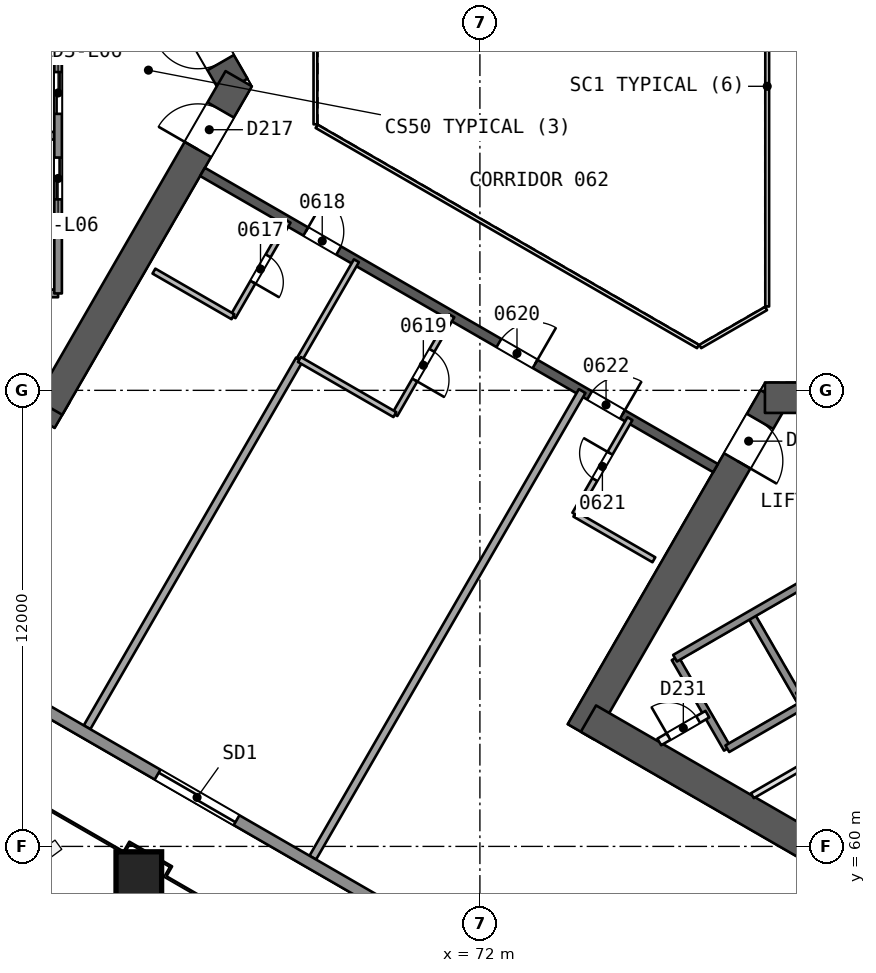
"""IFC4 building model, lengths in metres.
Left out: names, types, materials, properties, quantities, classifications, styles, units other than length and angle.
Written with IfcOpenShell. Run it as: python <this file> out.ifc"""

import sys

from ifc_helpers import new_model, si_unit, direction, frame, frame_2d, origin, origin_2d, place, context, subcontext, project, spatial, rectangle, extrude, element, fill, save


model = new_model("IFC4")
c1 = context("Model", 3, precision=1e-05, world=origin(), true_north=direction((0.0, 1.0)))
c2 = subcontext(c1, "Body", "Model", "MODEL_VIEW")
j1 = project(units=[si_unit("LENGTHUNIT", "METRE"), si_unit("PLANEANGLEUNIT", "RADIAN")], contexts=[c1])
p1 = place(None, origin())
s1 = spatial("IfcSite", under=j1, at=p1, CompositionType="ELEMENT")
p2 = place(p1, origin())
s2 = spatial("IfcBuilding", under=s1, at=p2, CompositionType="ELEMENT")
p3 = place(p2, frame((0.0, 0.0, 33.7)))
s3 = spatial("IfcBuildingStorey", under=s2, at=p3, CompositionType="ELEMENT", Elevation=33.7)
p4 = place(p3, frame((65.538, 80.0, 0.0), z_axis=(0.0, 0.0, 1.0), x_axis=(-0.49999662545, 0.866027352073, 0.0)))
e1 = element("IfcWall", 1, at=p4, inside=s3, PredefinedType="SHEAR", context=c2, shape_type="SweptSolid", body=[
    extrude(rectangle(XDim=10.149, YDim=0.8, at=frame_2d((5.074, 0.0))), origin(), (0.0, 0.0, 1.0), 3.7),
])
p5 = place(p4, frame((0.719, 0.0, 0.0)))
e2 = element("IfcOpeningElement", 2, at=p5, cuts=e1, PredefinedType="OPENING", context=c2, shape_type="SweptSolid", body=[
    extrude(rectangle(XDim=1.2, YDim=2.1, at=frame_2d((0.6, 1.05))), frame((0.0, 0.411, 0.0), z_axis=(0.0, -1.0, 0.0), x_axis=(1.0, 0.0, 0.0)), (0.0, 0.0, 1.0), 0.821),
])
p6 = place(p3, frame((48.797, 78.408, 0.0), z_axis=(0.0, 0.0, 1.0), x_axis=(0.866032504327, -0.499987701298, 0.0)))
e3 = element("IfcWall", 3, at=p6, inside=s3, PredefinedType="SHEAR", context=c2, shape_type="SweptSolid", body=[
    extrude(rectangle(XDim=14.102, YDim=0.8, at=frame_2d((7.051, 0.0))), origin(), (0.0, 0.0, 1.0), 3.7),
])
p7 = place(p3, frame((60.664, 71.557, 0.0), z_axis=(0.0, 0.0, 1.0), x_axis=(0.50000409368, 0.866023040284, 0.0)))
e4 = element("IfcWall", 4, at=p7, inside=s3, PredefinedType="SHEAR", context=c2, shape_type="SweptSolid", body=[
    extrude(rectangle(XDim=9.98, YDim=0.8, at=frame_2d((4.99, 0.0))), origin(), (0.0, 0.0, 1.0), 3.7),
])
p8 = place(p7, frame((7.83, 0.0, 0.0)))
e5 = element("IfcOpeningElement", 5, at=p8, cuts=e4, PredefinedType="OPENING", context=c2, shape_type="SweptSolid", body=[
    extrude(rectangle(XDim=1.2, YDim=2.1, at=frame_2d((0.6, 1.05))), frame((0.0, 0.411, 0.0), z_axis=(0.0, -1.0, 0.0), x_axis=(1.0, 0.0, 0.0)), (0.0, 0.0, 1.0), 0.821),
])
p9 = place(p3, frame((79.731, 71.806, 0.0), z_axis=(0.0, 0.0, 1.0), x_axis=(-0.49999662545, -0.866027352073, 0.0)))
e6 = element("IfcWall", 6, at=p9, inside=s3, PredefinedType="SHEAR", context=c2, shape_type="SweptSolid", body=[
    extrude(rectangle(XDim=10.149, YDim=0.8, at=frame_2d((5.074, 0.0))), origin(), (0.0, 0.0, 1.0), 3.7),
])
p10 = place(p9, frame((0.719, 0.0, 0.0)))
e7 = element("IfcOpeningElement", 7, at=p10, cuts=e6, PredefinedType="OPENING", context=c2, shape_type="SweptSolid", body=[
    extrude(rectangle(XDim=1.2, YDim=2.1, at=frame_2d((0.6, 1.05))), frame((0.0, 0.411, 0.0), z_axis=(0.0, -1.0, 0.0), x_axis=(1.0, 0.0, 0.0)), (0.0, 0.0, 1.0), 0.821),
])
p11 = place(p3, frame((74.856, 63.363, 0.0), z_axis=(0.0, 0.0, 1.0), x_axis=(0.866029478545, -0.499992942241, 0.0)))
e8 = element("IfcWall", 8, at=p11, inside=s3, PredefinedType="SHEAR", context=c2, shape_type="SweptSolid", body=[
    extrude(rectangle(XDim=13.933, YDim=0.8, at=frame_2d((6.967, 0.0))), origin(), (0.0, 0.0, 1.0), 3.7),
])
p12 = place(p3, frame((89.48, 71.806, 0.0), z_axis=(0.0, 0.0, 1.0), x_axis=(-1.0, 0.0, 0.0)))
e9 = element("IfcWall", 9, at=p12, inside=s3, PredefinedType="SHEAR", context=c2, shape_type="SweptSolid", body=[
    extrude(rectangle(XDim=9.98, YDim=0.8, at=frame_2d((4.99, 0.0))), origin(), (0.0, 0.0, 1.0), 3.7),
])
p13 = place(p12, frame((7.83, 0.0, 0.0)))
e10 = element("IfcOpeningElement", 10, at=p13, cuts=e9, PredefinedType="OPENING", context=c2, shape_type="SweptSolid", body=[
    extrude(rectangle(XDim=1.2, YDim=2.1, at=frame_2d((0.6, 1.05))), frame((0.0, 0.411, 0.0), z_axis=(0.0, -1.0, 0.0), x_axis=(1.0, 0.0, 0.0)), (0.0, 0.0, 1.0), 0.821),
])
p14 = place(p3, frame((64.7, 77.748, 0.0), z_axis=(0.0, 0.0, 1.0), x_axis=(0.866026492143, -0.499998114903, 0.0)))
e11 = element("IfcWall", 11, at=p14, inside=s3, PredefinedType="SHEAR", context=c2, shape_type="SweptSolid", body=[
    extrude(rectangle(XDim=15.588, YDim=0.25, at=frame_2d((7.794, 0.0))), origin(), (0.0, 0.0, 1.0), 3.2),
])
p15 = place(p14, frame((3.138, 0.0, 0.0)))
e12 = element("IfcOpeningElement", 12, at=p15, cuts=e11, PredefinedType="OPENING", context=c2, shape_type="SweptSolid", body=[
    extrude(rectangle(XDim=1.0, YDim=2.1, at=frame_2d((0.5, 1.05))), frame((0.0, 0.135, 0.0), z_axis=(0.0, -1.0, 0.0), x_axis=(1.0, 0.0, 0.0)), (0.0, 0.0, 1.0), 0.271),
])
p16 = place(p14, frame((9.006, 0.0, 0.0)))
e13 = element("IfcOpeningElement", 13, at=p16, cuts=e11, PredefinedType="OPENING", context=c2, shape_type="SweptSolid", body=[
    extrude(rectangle(XDim=1.1, YDim=2.1, at=frame_2d((0.55, 1.05))), frame((0.0, 0.135, 0.0), z_axis=(0.0, -1.0, 0.0), x_axis=(1.0, 0.0, 0.0)), (0.0, 0.0, 1.0), 0.271),
])
p17 = place(p14, frame((11.762, 0.0, 0.0)))
e14 = element("IfcOpeningElement", 14, at=p17, cuts=e11, PredefinedType="OPENING", context=c2, shape_type="SweptSolid", body=[
    extrude(rectangle(XDim=1.0, YDim=2.1, at=frame_2d((0.5, 1.05))), frame((0.0, 0.135, 0.0), z_axis=(0.0, -1.0, 0.0), x_axis=(1.0, 0.0, 0.0)), (0.0, 0.0, 1.0), 0.271),
])
p18 = place(p3, frame((63.012, 59.237, 0.0), z_axis=(0.010093620709, 0.017482414954, 0.999796221231), x_axis=(-0.499912926478, -0.865840372083, 0.020187025823)))
e15 = element("IfcColumn", 15, at=p18, inside=s3, PredefinedType="COLUMN", context=c2, shape_type="SweptSolid", body=[
    extrude(rectangle(XDim=1.2, YDim=1.2, at=origin_2d()), origin(), (0.0, 0.0, 1.0), 3.701),
])
p19 = place(p3, frame((66.952, 76.448, 0.0), z_axis=(0.0, 0.0, 1.0), x_axis=(-0.499987231761, -0.866032775405, 0.0)))
e16 = element("IfcWall", 16, at=p19, inside=s3, PredefinedType="PARTITIONING", context=c2, shape_type="SweptSolid", body=[
    extrude(rectangle(XDim=2.9, YDim=0.15, at=frame_2d((1.45, 0.0))), origin(), (0.0, 0.0, 1.0), 3.2),
])
p20 = place(p19, frame((1.05, 0.0, 0.0)))
e17 = element("IfcOpeningElement", 17, at=p20, cuts=e16, PredefinedType="OPENING", context=c2, shape_type="SweptSolid", body=[
    extrude(rectangle(XDim=0.8, YDim=2.1, at=frame_2d((0.4, 1.05))), frame((0.0, 0.085, 0.0), z_axis=(0.0, -1.0, 0.0), x_axis=(1.0, 0.0, 0.0)), (0.0, 0.0, 1.0), 0.171),
])
p21 = place(p3, frame((65.502, 73.937, 0.0), z_axis=(0.0, 0.0, 1.0), x_axis=(-0.865994240961, 0.500053971709, 0.0)))
e18 = element("IfcWall", 18, at=p21, inside=s3, PredefinedType="PARTITIONING", context=c2, shape_type="SweptSolid", body=[
    extrude(rectangle(XDim=2.401, YDim=0.15, at=frame_2d((1.201, 0.0))), origin(), (0.0, 0.0, 1.0), 3.2),
])
p22 = place(p3, frame((61.662, 63.133, 0.0), z_axis=(0.0, 0.0, 1.0), x_axis=(0.499999157533, 0.866025890183, 0.0)))
e19 = element("IfcWall", 19, at=p22, inside=s3, PredefinedType="PARTITIONING", context=c2, shape_type="SweptSolid", body=[
    extrude(rectangle(XDim=11.176, YDim=0.2, at=frame_2d((5.588, 0.0))), origin(), (0.0, 0.0, 1.0), 3.2),
])
p23 = place(p3, frame((67.25, 72.812, 0.0), z_axis=(0.0, 0.0, 1.0), x_axis=(0.499990139034, 0.866031096941, 0.0)))
e20 = element("IfcWall", 20, at=p23, inside=s3, PredefinedType="PARTITIONING", context=c2, shape_type="SweptSolid", body=[
    extrude(rectangle(XDim=3.0, YDim=0.15, at=frame_2d((1.5, 0.0))), origin(), (0.0, 0.0, 1.0), 3.2),
])
p24 = place(p3, frame((71.261, 73.96, 0.0), z_axis=(0.0, 0.0, 1.0), x_axis=(-0.50002537861, -0.866010750942, 0.0)))
e21 = element("IfcWall", 21, at=p24, inside=s3, PredefinedType="PARTITIONING", context=c2, shape_type="SweptSolid", body=[
    extrude(rectangle(XDim=3.0, YDim=0.15, at=frame_2d((1.5, 0.0))), origin(), (0.0, 0.0, 1.0), 3.2),
])
p25 = place(p24, frame((1.05, 0.0, 0.0)))
e22 = element("IfcOpeningElement", 22, at=p25, cuts=e21, PredefinedType="OPENING", context=c2, shape_type="SweptSolid", body=[
    extrude(rectangle(XDim=0.9, YDim=2.1, at=frame_2d((0.45, 1.05))), frame((0.0, 0.085, 0.0), z_axis=(0.0, -1.0, 0.0), x_axis=(1.0, 0.0, 0.0)), (0.0, 0.0, 1.0), 0.171),
])
p26 = place(p3, frame((69.761, 71.362, 0.0), z_axis=(0.0, 0.0, 1.0), x_axis=(-0.866032775405, 0.499987231761, 0.0)))
e23 = element("IfcWall", 23, at=p26, inside=s3, PredefinedType="PARTITIONING", context=c2, shape_type="SweptSolid", body=[
    extrude(rectangle(XDim=2.9, YDim=0.15, at=frame_2d((1.45, 0.0))), origin(), (0.0, 0.0, 1.0), 3.2),
])
p27 = place(p3, frame((67.602, 59.704, 0.0), z_axis=(0.0, 0.0, 1.0), x_axis=(0.499997249004, 0.866026992067, 0.0)))
e24 = element("IfcWall", 24, at=p27, inside=s3, PredefinedType="PARTITIONING", context=c2, shape_type="SweptSolid", body=[
    extrude(rectangle(XDim=14.176, YDim=0.2, at=frame_2d((7.088, 0.0))), origin(), (0.0, 0.0, 1.0), 3.2),
])
p28 = place(p3, frame((76.578, 67.542, 0.0), z_axis=(0.0, 0.0, 1.0), x_axis=(-0.866038271014, 0.499977712642, 0.0)))
e25 = element("IfcWall", 25, at=p28, inside=s3, PredefinedType="PARTITIONING", context=c2, shape_type="SweptSolid", body=[
    extrude(rectangle(XDim=2.401, YDim=0.15, at=frame_2d((1.2, 0.0))), origin(), (0.0, 0.0, 1.0), 3.2),
])
p29 = place(p3, frame((74.498, 68.743, 0.0), z_axis=(0.0, 0.0, 1.0), x_axis=(0.499987231761, 0.866032775405, 0.0)))
e26 = element("IfcWall", 26, at=p29, inside=s3, PredefinedType="PARTITIONING", context=c2, shape_type="SweptSolid", body=[
    extrude(rectangle(XDim=2.9, YDim=0.15, at=frame_2d((1.45, 0.0))), origin(), (0.0, 0.0, 1.0), 3.2),
])
p30 = place(p29, frame((1.05, 0.0, 0.0)))
e27 = element("IfcOpeningElement", 27, at=p30, cuts=e26, PredefinedType="OPENING", context=c2, shape_type="SweptSolid", body=[
    extrude(rectangle(XDim=0.8, YDim=2.1, at=frame_2d((0.4, 1.05))), frame((0.0, 0.085, 0.0), z_axis=(0.0, -1.0, 0.0), x_axis=(1.0, 0.0, 0.0)), (0.0, 0.0, 1.0), 0.171),
])
p31 = place(p3, frame((90.965, 46.043, 0.0), z_axis=(0.0, 0.0, 1.0), x_axis=(-0.866024438126, 0.500001672566, 0.0)))
e28 = element("IfcWall", 28, at=p31, inside=s3, PredefinedType="SOLIDWALL", context=c2, shape_type="SweptSolid", body=[
    extrude(rectangle(XDim=61.61, YDim=0.3, at=frame_2d((30.805, 0.0))), origin(), (0.0, 0.0, 1.0), 3.2),
])
p32 = place(p31, frame((29.293, 0.0, 0.0)))
e29 = element("IfcOpeningElement", 29, at=p32, cuts=e28, PredefinedType="OPENING", context=c2, shape_type="SweptSolid", body=[
    extrude(rectangle(XDim=2.4, YDim=2.4, at=frame_2d((1.2, 1.2))), frame((0.0, 0.161, 0.0), z_axis=(0.0, -1.0, 0.0), x_axis=(1.0, 0.0, 0.0)), (0.0, 0.0, 1.0), 0.321),
])
p33 = place(p31, frame((46.61, 0.0, 0.0)))
e30 = element("IfcOpeningElement", 30, at=p33, cuts=e28, PredefinedType="OPENING", context=c2, shape_type="SweptSolid", body=[
    extrude(rectangle(XDim=2.4, YDim=2.4, at=frame_2d((1.2, 1.2))), frame((0.0, 0.161, 0.0), z_axis=(0.0, -1.0, 0.0), x_axis=(1.0, 0.0, 0.0)), (0.0, 0.0, 1.0), 0.321),
])
p34 = place(p31, frame((12.289, 0.0, 0.0)))
e31 = element("IfcOpeningElement", 31, at=p34, cuts=e28, PredefinedType="OPENING", context=c2, shape_type="SweptSolid", body=[
    extrude(rectangle(XDim=2.4, YDim=2.4, at=frame_2d((1.2, 1.2))), frame((0.0, 0.161, 0.0), z_axis=(0.0, -1.0, 0.0), x_axis=(1.0, 0.0, 0.0)), (0.0, 0.0, 1.0), 0.321),
])
for number, where, z_axis, x_axis in (
    (32, (60.9, 80.95, 0.0), (0.0, 0.0, 1.0), (-1.0, 0.0, 0.0)),
    (33, (60.9, 78.7, 0.0), (0.0, 0.0, 1.0), (-1.0, 0.0, 0.0)),
):
    element("IfcWall", number, at=place(p3, frame(where, z_axis=z_axis, x_axis=x_axis)), inside=s3, PredefinedType="SOLIDWALL", context=c2, shape_type="SweptSolid", body=[
        extrude(rectangle(XDim=2.48, YDim=0.2, at=frame_2d((1.24, 0.0))), origin(), (0.0, 0.0, 1.0), 3.2),
    ])
for number, where, z_axis, x_axis in (
    (34, (60.9, 76.45, 0.0), (0.0, 0.0, 1.0), (-1.0, 0.0, 0.0)),
    (35, (60.9, 74.55, 0.0), (0.0, 0.0, 1.0), (-1.0, 0.0, 0.0)),
):
    element("IfcWall", number, at=place(p3, frame(where, z_axis=z_axis, x_axis=x_axis)), inside=s3, PredefinedType="SOLIDWALL", context=c2, shape_type="SweptSolid", body=[
        extrude(rectangle(XDim=3.05, YDim=0.2, at=frame_2d((1.525, 0.0))), origin(), (0.0, 0.0, 1.0), 3.2),
    ])
p35 = place(p3, frame((60.9, 85.45, 0.0), z_axis=(0.0, 0.0, 1.0), x_axis=(0.0, -1.0, 0.0)))
e36 = element("IfcWall", 36, at=p35, inside=s3, PredefinedType="SOLIDWALL", context=c2, shape_type="SweptSolid", body=[
    extrude(rectangle(XDim=10.9, YDim=0.2, at=frame_2d((5.45, 0.0))), origin(), (0.0, 0.0, 1.0), 3.2),
])
p36 = place(p35, frame((0.575, 0.0, 0.0)))
e37 = element("IfcOpeningElement", 37, at=p36, cuts=e36, PredefinedType="OPENING", context=c2, shape_type="SweptSolid", body=[
    extrude(rectangle(XDim=1.1, YDim=2.1, at=frame_2d((0.55, 1.05))), frame((0.0, 0.11, 0.0), z_axis=(0.0, -1.0, 0.0), x_axis=(1.0, 0.0, 0.0)), (0.0, 0.0, 1.0), 0.221),
])
p37 = place(p35, frame((2.825, 0.0, 0.0)))
e38 = element("IfcOpeningElement", 38, at=p37, cuts=e36, PredefinedType="OPENING", context=c2, shape_type="SweptSolid", body=[
    extrude(rectangle(XDim=1.1, YDim=2.1, at=frame_2d((0.55, 1.05))), frame((0.0, 0.11, 0.0), z_axis=(0.0, -1.0, 0.0), x_axis=(1.0, 0.0, 0.0)), (0.0, 0.0, 1.0), 0.221),
])
p38 = place(p35, frame((5.075, 0.0, 0.0)))
e39 = element("IfcOpeningElement", 39, at=p38, cuts=e36, PredefinedType="OPENING", context=c2, shape_type="SweptSolid", body=[
    extrude(rectangle(XDim=1.1, YDim=2.1, at=frame_2d((0.55, 1.05))), frame((0.0, 0.11, 0.0), z_axis=(0.0, -1.0, 0.0), x_axis=(1.0, 0.0, 0.0)), (0.0, 0.0, 1.0), 0.221),
])
p39 = place(p35, frame((7.325, 0.0, 0.0)))
e40 = element("IfcOpeningElement", 40, at=p39, cuts=e36, PredefinedType="OPENING", context=c2, shape_type="SweptSolid", body=[
    extrude(rectangle(XDim=1.1, YDim=2.1, at=frame_2d((0.55, 1.05))), frame((0.0, 0.11, 0.0), z_axis=(0.0, -1.0, 0.0), x_axis=(1.0, 0.0, 0.0)), (0.0, 0.0, 1.0), 0.221),
])
for number, where, z_axis, x_axis in (
    (41, (77.135, 64.952, 0.0), (0.0, 0.0, 1.0), (0.5, -0.866, 0.0)),
    (42, (79.127, 66.102, 0.0), (0.0, 0.0, 1.0), (0.5, -0.866, 0.0)),
):
    element("IfcWall", number, at=place(p3, frame(where, z_axis=z_axis, x_axis=x_axis)), inside=s3, PredefinedType="SOLIDWALL", context=c2, shape_type="SweptSolid", body=[
        extrude(rectangle(XDim=2.75, YDim=0.2, at=frame_2d((1.375, 0.0))), origin(), (0.0, 0.0, 1.0), 3.2),
    ])
p40 = place(p3, frame((77.135, 64.952, 0.0), z_axis=(0.0, 0.0, 1.0), x_axis=(0.866031916153, 0.499988720078, 0.0)))
e43 = element("IfcWall", 43, at=p40, inside=s3, PredefinedType="SOLIDWALL", context=c2, shape_type="SweptSolid", body=[
    extrude(rectangle(XDim=11.35, YDim=0.2, at=frame_2d((5.675, 0.0))), origin(), (0.0, 0.0, 1.0), 3.2),
])
p41 = place(p3, frame((76.72, 62.749, 0.0), z_axis=(0.0, 0.0, 1.0), x_axis=(0.866054810376, 0.49994906283, 0.0)))
e44 = element("IfcWall", 44, at=p41, inside=s3, PredefinedType="PARTITIONING", context=c2, shape_type="SweptSolid", body=[
    extrude(rectangle(XDim=1.461, YDim=0.2, at=frame_2d((0.73, 0.0))), origin(), (0.0, 0.0, 1.0), 3.2),
])
p42 = place(p41, frame((0.281, 0.0, 0.0)))
e45 = element("IfcOpeningElement", 45, at=p42, cuts=e44, PredefinedType="OPENING", context=c2, shape_type="SweptSolid", body=[
    extrude(rectangle(XDim=0.9, YDim=2.1, at=frame_2d((0.45, 1.05))), frame((0.0, 0.11, 0.0), z_axis=(0.0, -1.0, 0.0), x_axis=(1.0, 0.0, 0.0)), (0.0, 0.0, 1.0), 0.221),
])
p43 = place(p3, frame((80.367, 63.954, 0.0), z_axis=(0.0, 0.0, 1.0), x_axis=(0.866026575979, 0.499997969693, 0.0)))
e46 = element("IfcWall", 46, at=p43, inside=s3, PredefinedType="SOLIDWALL", context=c2, shape_type="SweptSolid", body=[
    extrude(rectangle(XDim=6.75, YDim=0.2, at=frame_2d((3.375, 0.0))), origin(), (0.0, 0.0, 1.0), 3.2),
])
p44 = place(p3, frame((78.51, 62.57, 0.0), z_axis=(0.0, 0.0, 1.0), x_axis=(0.866053019151, 0.499952165731, 0.0)))
e47 = element("IfcWall", 47, at=p44, inside=s3, PredefinedType="SOLIDWALL", context=c2, shape_type="SweptSolid", body=[
    extrude(rectangle(XDim=2.3, YDim=0.2, at=frame_2d((1.15, 0.0))), origin(), (0.0, 0.0, 1.0), 3.2),
])
p45 = place(p3, frame((79.17, 61.334, 0.0), z_axis=(0.0, 0.0, 1.0), x_axis=(0.866030041738, 0.499991966744, 0.0)))
e48 = element("IfcWall", 48, at=p45, inside=s3, PredefinedType="PARTITIONING", context=c2, shape_type="SweptSolid", body=[
    extrude(rectangle(XDim=2.222, YDim=0.15, at=frame_2d((1.111, 0.0))), origin(), (0.0, 0.0, 1.0), 3.2),
])
p46 = place(p3, frame((79.56, 74.206, 0.0), z_axis=(0.0, 0.0, 1.0), x_axis=(0.0, 1.0, 0.0)))
e49 = element("IfcWall", 49, at=p46, inside=s3, PredefinedType="PARTITIONING", context=c2, shape_type="SweptSolid", body=[
    extrude(rectangle(XDim=11.588, YDim=0.1, at=frame_2d((5.794, 0.0))), origin(), (0.0, 0.0, 1.0), 3.2),
])
p47 = place(p3, frame((67.672, 81.0, 0.0), z_axis=(0.0, 0.0, 1.0), x_axis=(0.0, -1.0, 0.0)))
e50 = element("IfcWall", 50, at=p47, inside=s3, PredefinedType="PARTITIONING", context=c2, shape_type="SweptSolid", body=[
    extrude(rectangle(XDim=2.0, YDim=0.1, at=frame_2d((1.0, 0.0))), origin(), (0.0, 0.0, 1.0), 3.2),
])
p48 = place(p3, frame((67.702, 78.948, 0.0), z_axis=(0.0, 0.0, 1.0), x_axis=(0.866026658274, -0.499997827154, 0.0)))
e51 = element("IfcWall", 51, at=p48, inside=s3, PredefinedType="PARTITIONING", context=c2, shape_type="SweptSolid", body=[
    extrude(rectangle(XDim=11.588, YDim=0.1, at=frame_2d((5.794, 0.0))), origin(), (0.0, 0.0, 1.0), 3.2),
])
p49 = place(p3, frame((77.798, 73.154, 0.0), z_axis=(0.0, 0.0, 1.0), x_axis=(0.866041268327, 0.499972520799, 0.0)))
e52 = element("IfcWall", 52, at=p49, inside=s3, PredefinedType="PARTITIONING", context=c2, shape_type="SweptSolid", body=[
    extrude(rectangle(XDim=2.0, YDim=0.1, at=frame_2d((1.0, 0.0))), origin(), (0.0, 0.0, 1.0), 3.2),
])
p50 = place(p20, origin())
e53 = element("IfcDoor", 53, at=p50, inside=s3, OperationType="SINGLE_SWING_RIGHT", PredefinedType="NOTDEFINED", context=c2, shape_type="SweptSolid", body=[
    extrude(rectangle(XDim=0.8, YDim=2.1, at=frame_2d((0.4, 1.05))), frame((0.0, 0.025, 0.0), z_axis=(0.0, -1.0, 0.0), x_axis=(1.0, 0.0, 0.0)), (0.0, 0.0, 1.0), 0.05),
])
fill(e17, e53)
p51 = place(p15, origin())
e54 = element("IfcDoor", 54, at=p51, inside=s3, OperationType="SINGLE_SWING_LEFT", PredefinedType="NOTDEFINED", context=c2, shape_type="SweptSolid", body=[
    extrude(rectangle(XDim=1.0, YDim=2.1, at=frame_2d((0.5, 1.05))), frame((0.0, 0.025, 0.0), z_axis=(0.0, -1.0, 0.0), x_axis=(1.0, 0.0, 0.0)), (0.0, 0.0, 1.0), 0.05),
])
fill(e12, e54)
p52 = place(p25, origin())
e55 = element("IfcDoor", 55, at=p52, inside=s3, OperationType="SINGLE_SWING_RIGHT", PredefinedType="NOTDEFINED", context=c2, shape_type="SweptSolid", body=[
    extrude(rectangle(XDim=0.9, YDim=2.1, at=frame_2d((0.45, 1.05))), frame((0.0, 0.025, 0.0), z_axis=(0.0, -1.0, 0.0), x_axis=(1.0, 0.0, 0.0)), (0.0, 0.0, 1.0), 0.05),
])
fill(e22, e55)
p53 = place(p16, origin())
e56 = element("IfcDoor", 56, at=p53, inside=s3, OperationType="SINGLE_SWING_RIGHT", PredefinedType="NOTDEFINED", context=c2, shape_type="SweptSolid", body=[
    extrude(rectangle(XDim=1.1, YDim=2.1, at=frame_2d((0.55, 1.05))), frame((0.0, 0.025, 0.0), z_axis=(0.0, -1.0, 0.0), x_axis=(1.0, 0.0, 0.0)), (0.0, 0.0, 1.0), 0.05),
])
fill(e13, e56)
p54 = place(p30, origin())
e57 = element("IfcDoor", 57, at=p54, inside=s3, OperationType="SINGLE_SWING_RIGHT", PredefinedType="NOTDEFINED", context=c2, shape_type="SweptSolid", body=[
    extrude(rectangle(XDim=0.8, YDim=2.1, at=frame_2d((0.4, 1.05))), frame((0.0, 0.025, 0.0), z_axis=(0.0, -1.0, 0.0), x_axis=(1.0, 0.0, 0.0)), (0.0, 0.0, 1.0), 0.05),
])
fill(e27, e57)
p55 = place(p17, origin())
e58 = element("IfcDoor", 58, at=p55, inside=s3, OperationType="SINGLE_SWING_RIGHT", PredefinedType="NOTDEFINED", context=c2, shape_type="SweptSolid", body=[
    extrude(rectangle(XDim=1.0, YDim=2.1, at=frame_2d((0.5, 1.05))), frame((0.0, 0.025, 0.0), z_axis=(0.0, -1.0, 0.0), x_axis=(1.0, 0.0, 0.0)), (0.0, 0.0, 1.0), 0.05),
])
fill(e14, e58)
p56 = place(p32, origin())
e59 = element("IfcDoor", 59, at=p56, inside=s3, OperationType="SLIDING_TO_LEFT", PredefinedType="NOTDEFINED", context=c2, shape_type="SweptSolid", body=[
    extrude(rectangle(XDim=2.4, YDim=2.4, at=frame_2d((1.2, 1.2))), frame((0.0, 0.025, 0.0), z_axis=(0.0, -1.0, 0.0), x_axis=(1.0, 0.0, 0.0)), (0.0, 0.0, 1.0), 0.05),
])
fill(e29, e59)
p57 = place(p5, origin())
e60 = element("IfcDoor", 60, at=p57, inside=s3, OperationType="SINGLE_SWING_RIGHT", PredefinedType="NOTDEFINED", context=c2, shape_type="SweptSolid", body=[
    extrude(rectangle(XDim=1.2, YDim=2.1, at=frame_2d((0.6, 1.05))), frame((0.0, 0.025, 0.0), z_axis=(0.0, -1.0, 0.0), x_axis=(1.0, 0.0, 0.0)), (0.0, 0.0, 1.0), 0.05),
])
fill(e2, e60)
p58 = place(p8, origin())
e61 = element("IfcDoor", 61, at=p58, inside=s3, OperationType="SINGLE_SWING_LEFT", PredefinedType="NOTDEFINED", context=c2, shape_type="SweptSolid", body=[
    extrude(rectangle(XDim=1.2, YDim=2.1, at=frame_2d((0.6, 1.05))), frame((0.0, 0.025, 0.0), z_axis=(0.0, -1.0, 0.0), x_axis=(1.0, 0.0, 0.0)), (0.0, 0.0, 1.0), 0.05),
])
fill(e5, e61)
p59 = place(p38, origin())
e62 = element("IfcDoor", 62, at=p59, inside=s3, OperationType="SLIDING_TO_RIGHT", PredefinedType="NOTDEFINED", context=c2, shape_type="SweptSolid", body=[
    extrude(rectangle(XDim=1.1, YDim=2.1, at=frame_2d((0.55, 1.05))), frame((0.0, 0.025, 0.0), z_axis=(0.0, -1.0, 0.0), x_axis=(1.0, 0.0, 0.0)), (0.0, 0.0, 1.0), 0.05),
])
fill(e39, e62)
p60 = place(p39, origin())
e63 = element("IfcDoor", 63, at=p60, inside=s3, OperationType="SLIDING_TO_LEFT", PredefinedType="NOTDEFINED", context=c2, shape_type="SweptSolid", body=[
    extrude(rectangle(XDim=1.1, YDim=2.1, at=frame_2d((0.55, 1.05))), frame((0.0, 0.025, 0.0), z_axis=(0.0, -1.0, 0.0), x_axis=(1.0, 0.0, 0.0)), (0.0, 0.0, 1.0), 0.05),
])
fill(e40, e63)
p61 = place(p10, origin())
e64 = element("IfcDoor", 64, at=p61, inside=s3, OperationType="SINGLE_SWING_RIGHT", PredefinedType="NOTDEFINED", context=c2, shape_type="SweptSolid", body=[
    extrude(rectangle(XDim=1.2, YDim=2.1, at=frame_2d((0.6, 1.05))), frame((0.0, 0.025, 0.0), z_axis=(0.0, -1.0, 0.0), x_axis=(1.0, 0.0, 0.0)), (0.0, 0.0, 1.0), 0.05),
])
fill(e7, e64)
p62 = place(p42, origin())
e65 = element("IfcDoor", 65, at=p62, inside=s3, OperationType="SINGLE_SWING_LEFT", PredefinedType="NOTDEFINED", context=c2, shape_type="SweptSolid", body=[
    extrude(rectangle(XDim=0.9, YDim=2.1, at=frame_2d((0.45, 1.05))), frame((0.0, 0.025, 0.0), z_axis=(0.0, -1.0, 0.0), x_axis=(1.0, 0.0, 0.0)), (0.0, 0.0, 1.0), 0.05),
])
fill(e45, e65)
save(model, sys.argv[1])
